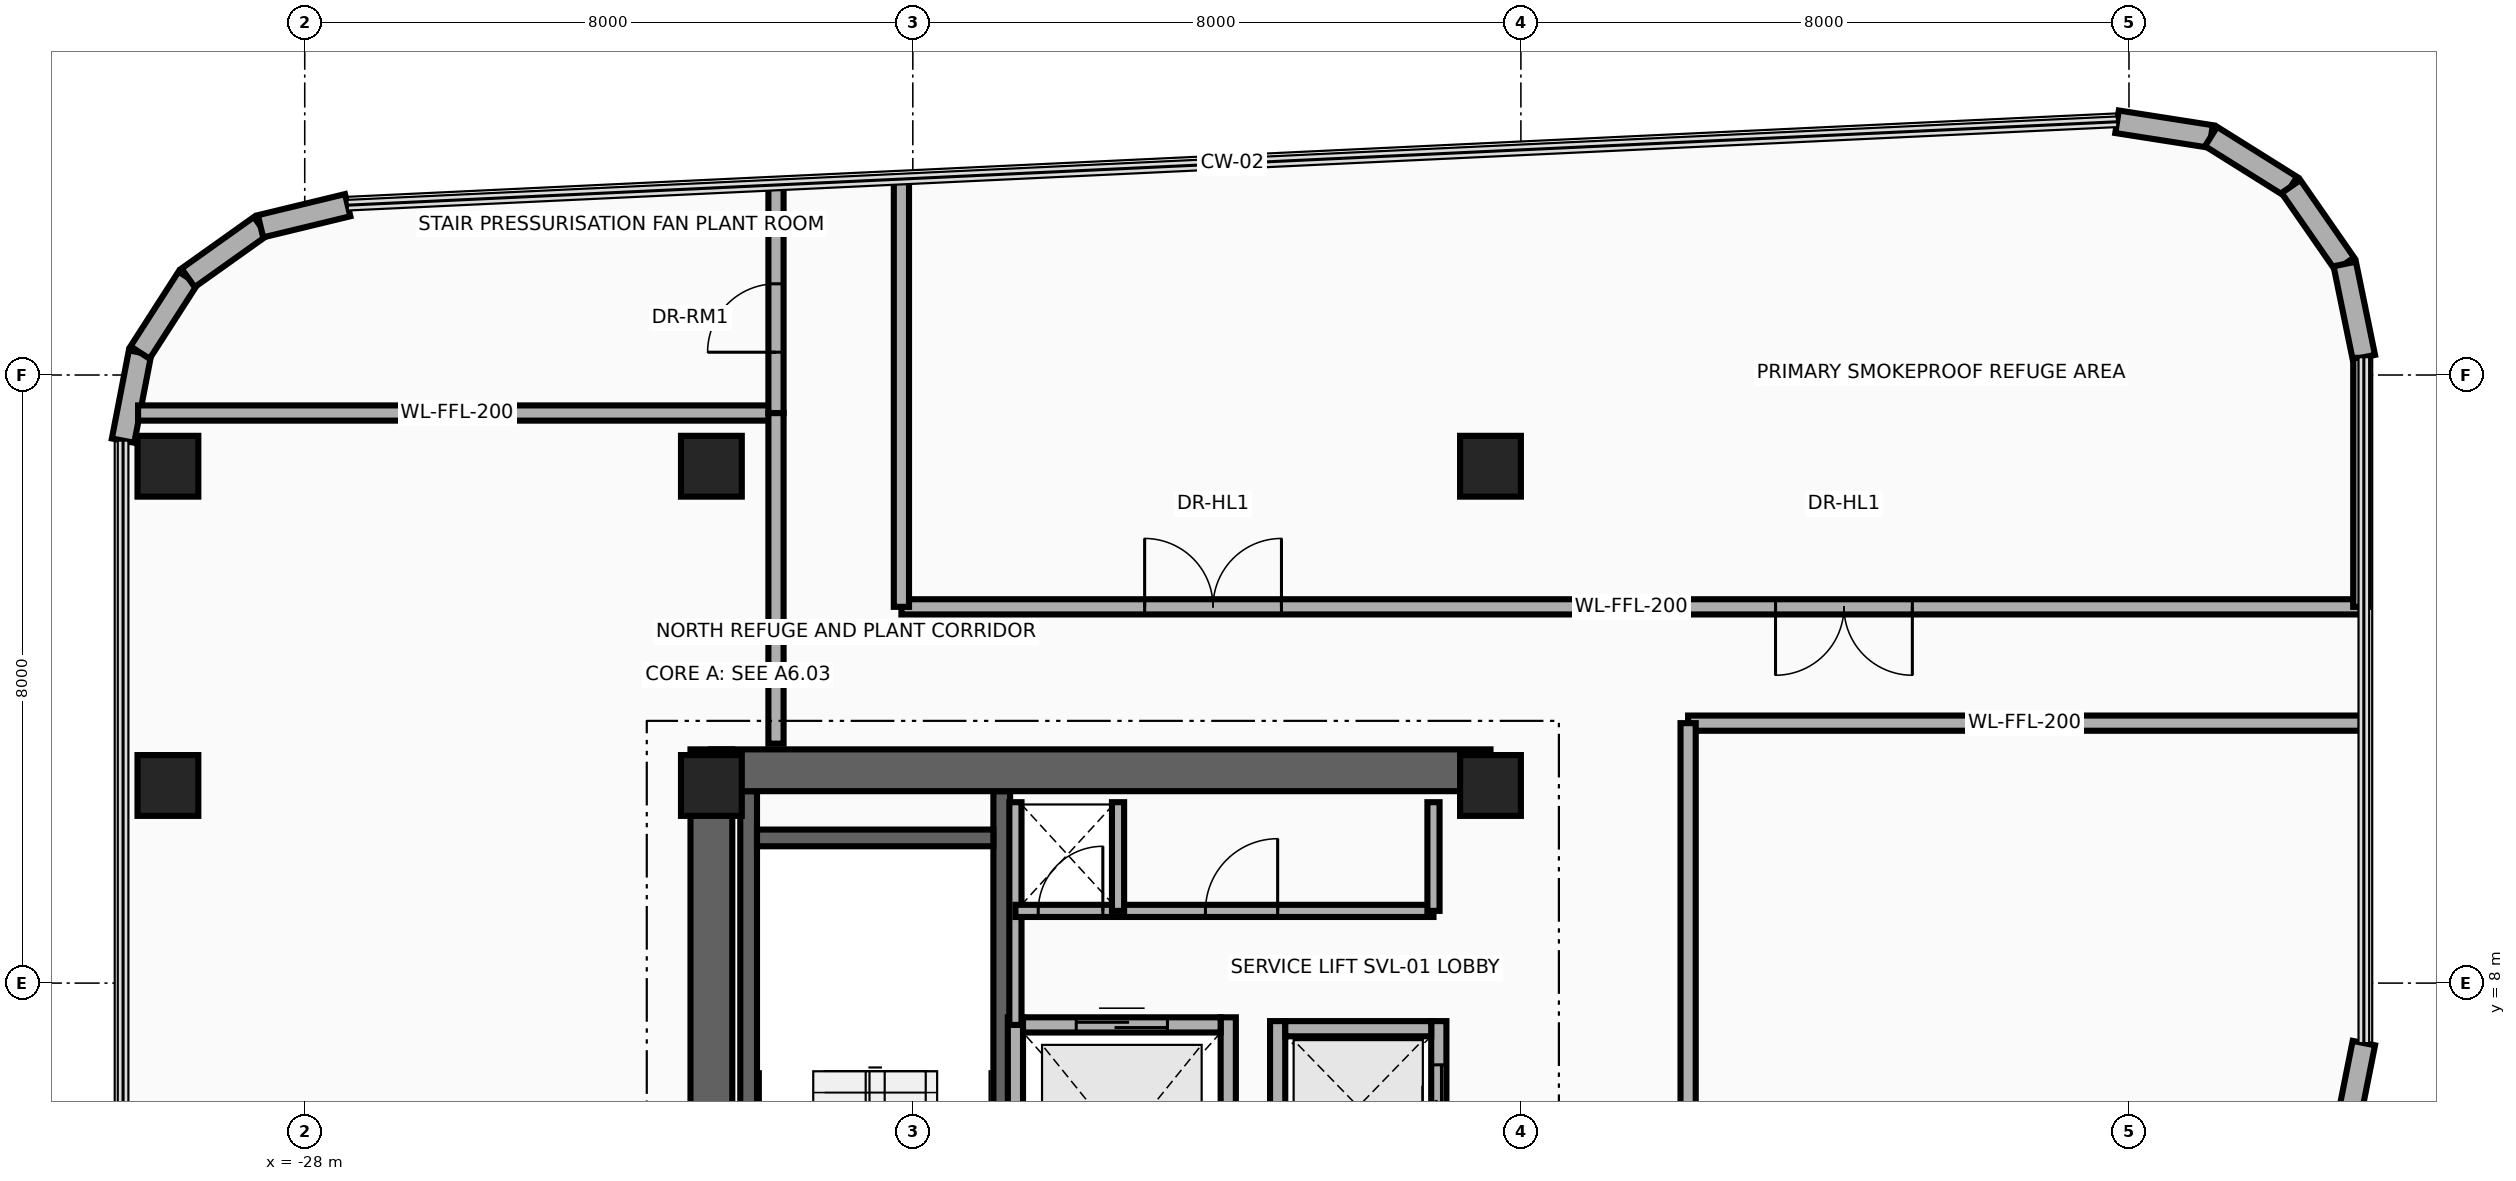
"""IFC4 building model, lengths in metres.
Left out: names, types, materials, properties, quantities, classifications, styles, units other than length and angle.
Written with IfcOpenShell. Run it as: python <this file> out.ifc"""

import sys

from ifc_helpers import new_model, si_unit, direction, frame, frame_2d, origin, origin_2d, place, context, subcontext, project, spatial, rectangle, extrude, source, transform, mapped, element, fill, save


model = new_model("IFC4")
c1 = context("Model", 3, precision=1e-05, world=origin(), true_north=direction((0.0, 1.0)))
c2 = subcontext(c1, "Body", "Model", "MODEL_VIEW")
j1 = project(units=[si_unit("LENGTHUNIT", "METRE"), si_unit("PLANEANGLEUNIT", "RADIAN")], contexts=[c1])
p1 = place(None, origin())
s1 = spatial("IfcSite", under=j1, at=p1, CompositionType="ELEMENT")
p2 = place(p1, origin())
s2 = spatial("IfcBuilding", under=s1, at=p2, CompositionType="ELEMENT")
p3 = place(p2, frame((0.0, 0.0, 261.5)))
s3 = spatial("IfcBuildingStorey", under=s2, at=p3, CompositionType="ELEMENT", Elevation=261.5)
for number, where, z_axis, x_axis in (
    (1, (-22.16, 1.78, 0.0), (0.0, 0.0, 1.0), (0.0, 1.0, 0.0)),
    (2, (-18.83, 1.78, 0.0), (0.0, 0.0, 1.0), (0.0, 1.0, 0.0)),
):
    element("IfcWall", number, at=place(p3, frame(where, z_axis=z_axis, x_axis=x_axis)), inside=s3, PredefinedType="SHEAR", context=c2, shape_type="SweptSolid", body=[
        extrude(rectangle(XDim=8.745, YDim=0.22, at=frame_2d((4.373, 0.0))), origin(), (0.0, 0.0, 1.0), 4.26),
    ])
p4 = place(p3, frame((-22.05, 9.91, 0.0), z_axis=(0.0, 0.0, 1.0), x_axis=(1.0, 0.0, 0.0)))
e3 = element("IfcWall", 3, at=p4, inside=s3, PredefinedType="SHEAR", context=c2, shape_type="SweptSolid", body=[
    extrude(rectangle(XDim=3.11, YDim=0.22, at=frame_2d((1.555, 0.0))), origin(), (0.0, 0.0, 1.0), 4.26),
])
p5 = place(p3, frame((-22.65, -11.075, 0.0), z_axis=(0.0, 0.0, 1.0), x_axis=(0.0, 1.0, 0.0)))
e4 = element("IfcWall", 4, at=p5, inside=s3, PredefinedType="SHEAR", context=c2, shape_type="SweptSolid", body=[
    extrude(rectangle(XDim=22.15, YDim=0.55, at=frame_2d((11.075, 0.0))), origin(), (0.0, 0.0, 1.0), 4.26),
])
p6 = place(p3, frame((-22.65, 10.8, 0.0), z_axis=(0.0, 0.0, 1.0), x_axis=(1.0, 0.0, 0.0)))
e5 = element("IfcWall", 5, at=p6, inside=s3, PredefinedType="SHEAR", context=c2, shape_type="SweptSolid", body=[
    extrude(rectangle(XDim=10.25, YDim=0.55, at=frame_2d((5.125, 0.0))), origin(), (0.0, 0.0, 1.0), 4.26),
])
m1 = source(origin(), c2, "Body", "SweptSolid", [
    extrude(rectangle(XDim=0.8, YDim=0.8, at=origin_2d()), origin(), (0.0, 0.0, 1.0), 4.5),
])
for number, where, z_axis, x_axis in (
    (6, (-29.8, 10.6, 0.0), (0.0, 0.0, 1.0), (1.0, 0.0, 0.0)),
    (7, (-22.65, 10.6, 0.0), (0.0, 0.0, 1.0), (1.0, 0.0, 0.0)),
    (8, (-12.4, 10.6, 0.0), (0.0, 0.0, 1.0), (1.0, 0.0, 0.0)),
    (9, (-29.8, 14.8, 0.0), (0.0, 0.0, 1.0), (1.0, 0.0, 0.0)),
    (10, (-22.65, 14.8, 0.0), (0.0, 0.0, 1.0), (1.0, 0.0, 0.0)),
    (11, (-12.4, 14.8, 0.0), (0.0, 0.0, 1.0), (1.0, 0.0, 0.0)),
):
    element("IfcColumn", number, at=place(p3, frame(where, z_axis=z_axis, x_axis=x_axis)), inside=s3, PredefinedType="COLUMN", context=c2, shape_type="MappedRepresentation", body=[
        mapped(m1, transform((0.0, 0.0, 0.0), x_axis=(1.0, 0.0, 0.0), y_axis=(0.0, 1.0, 0.0), z_axis=(0.0, 0.0, 1.0), scale=1.0)),
    ])
p7 = place(p3, frame((-30.39, 15.137, 0.0), z_axis=(0.0, 0.0, 1.0), x_axis=(0.189307792679, 0.981917796779, 0.0)))
e12 = element("IfcWall", 12, at=p7, inside=s3, PredefinedType="SOLIDWALL", context=c2, shape_type="SweptSolid", body=[
    extrude(rectangle(XDim=1.18, YDim=0.3, at=frame_2d((0.59, 0.0))), origin(), (0.0, 0.0, 1.0), 4.26),
])
p8 = place(p3, frame((-30.167, 16.295, 0.0), z_axis=(0.0, 0.0, 1.0), x_axis=(0.540842020947, 0.841124193195, 0.0)))
e13 = element("IfcWall", 13, at=p8, inside=s3, PredefinedType="SOLIDWALL", context=c2, shape_type="SweptSolid", body=[
    extrude(rectangle(XDim=1.169, YDim=0.3, at=frame_2d((0.584, 0.0))), origin(), (0.0, 0.0, 1.0), 4.26),
])
p9 = place(p3, frame((-29.534, 17.279, 0.0), z_axis=(0.0, 0.0, 1.0), x_axis=(0.81466371606, 0.579933642527, 0.0)))
e14 = element("IfcWall", 14, at=p9, inside=s3, PredefinedType="SOLIDWALL", context=c2, shape_type="SweptSolid", body=[
    extrude(rectangle(XDim=1.169, YDim=0.3, at=frame_2d((0.584, 0.0))), origin(), (0.0, 0.0, 1.0), 4.26),
])
p10 = place(p3, frame((-28.582, 17.957, 0.0), z_axis=(0.0, 0.0, 1.0), x_axis=(0.971929016595, 0.235274279725, 0.0)))
e15 = element("IfcWall", 15, at=p10, inside=s3, PredefinedType="SOLIDWALL", context=c2, shape_type="SweptSolid", body=[
    extrude(rectangle(XDim=1.18, YDim=0.3, at=frame_2d((0.59, 0.0))), origin(), (0.0, 0.0, 1.0), 4.26),
])
p11 = place(p3, frame((-4.157, 19.332, 0.0), z_axis=(0.0, 0.0, 1.0), x_axis=(0.987969236552, -0.15465053387, 0.0)))
e16 = element("IfcWall", 16, at=p11, inside=s3, PredefinedType="SOLIDWALL", context=c2, shape_type="SweptSolid", body=[
    extrude(rectangle(XDim=1.252, YDim=0.3, at=frame_2d((0.626, 0.0))), origin(), (0.0, 0.0, 1.0), 4.26),
])
for number, where, z_axis, x_axis in (
    (17, (-2.92, 19.138, 0.0), (0.0, 0.0, 1.0), (0.847, -0.531, 0.0)),
    (18, (-1.869, 18.48, 0.0), (0.0, 0.0, 1.0), (0.57, -0.822, 0.0)),
):
    element("IfcWall", number, at=place(p3, frame(where, z_axis=z_axis, x_axis=x_axis)), inside=s3, PredefinedType="SOLIDWALL", context=c2, shape_type="SweptSolid", body=[
        extrude(rectangle(XDim=1.24, YDim=0.3, at=frame_2d((0.62, 0.0))), origin(), (0.0, 0.0, 1.0), 4.26),
    ])
p12 = place(p3, frame((-1.161, 17.461, 0.0), z_axis=(0.0, 0.0, 1.0), x_axis=(0.20087696073, -0.979616479367, 0.0)))
e19 = element("IfcWall", 19, at=p12, inside=s3, PredefinedType="SOLIDWALL", context=c2, shape_type="SweptSolid", body=[
    extrude(rectangle(XDim=1.252, YDim=0.3, at=frame_2d((0.626, 0.0))), origin(), (0.0, 0.0, 1.0), 4.26),
])
p13 = place(p3, frame((-0.91, 7.211, 0.0), z_axis=(0.0, 0.0, 1.0), x_axis=(-0.195189223115, -0.980765602568, 0.0)))
e20 = element("IfcWall", 20, at=p13, inside=s3, PredefinedType="SOLIDWALL", context=c2, shape_type="SweptSolid", body=[
    extrude(rectangle(XDim=1.216, YDim=0.3, at=frame_2d((0.608, 0.0))), origin(), (0.0, 0.0, 1.0), 4.26),
])
for number, where, z_axis, x_axis in (
    (21, (-18.65, 4.225, 0.0), (0.0, 0.0, 1.0), (0.0, 1.0, 0.0)),
    (22, (-15.85, 4.225, 0.0), (0.0, 0.0, 1.0), (0.0, 1.0, 0.0)),
):
    element("IfcWall", number, at=place(p3, frame(where, z_axis=z_axis, x_axis=x_axis)), inside=s3, PredefinedType="MOVABLE", context=c2, shape_type="SweptSolid", body=[
        extrude(rectangle(XDim=3.325, YDim=0.2, at=frame_2d((1.663, 0.0))), origin(), (0.0, 0.0, 1.0), 4.26),
    ])
p14 = place(p3, frame((-18.55, 7.45, 0.0), z_axis=(0.0, 0.0, 1.0), x_axis=(1.0, 0.0, 0.0)))
e23 = element("IfcWall", 23, at=p14, inside=s3, PredefinedType="MOVABLE", context=c2, shape_type="SweptSolid", body=[
    extrude(rectangle(XDim=2.6, YDim=0.2, at=frame_2d((1.3, 0.0))), origin(), (0.0, 0.0, 1.0), 4.26),
])
p15 = place(p14, frame((0.7, 0.0, 0.0)))
e24 = element("IfcOpeningElement", 24, at=p15, cuts=e23, PredefinedType="OPENING", context=c2, shape_type="SweptSolid", body=[
    extrude(rectangle(XDim=1.2, YDim=2.1, at=frame_2d((0.6, 1.05))), frame((0.0, 0.115, 0.0), z_axis=(0.0, -1.0, 0.0), x_axis=(1.0, 0.0, 0.0)), (0.0, 0.0, 1.0), 0.23),
])
p16 = place(p3, frame((-15.2, 5.25, 0.0), z_axis=(0.0, 0.0, 1.0), x_axis=(0.0, 1.0, 0.0)))
e25 = element("IfcWall", 25, at=p16, inside=s3, PredefinedType="MOVABLE", context=c2, shape_type="SweptSolid", body=[
    extrude(rectangle(XDim=2.25, YDim=0.2, at=frame_2d((1.125, 0.0))), origin(), (0.0, 0.0, 1.0), 4.26),
])
p17 = place(p3, frame((-13.08, 5.25, 0.0), z_axis=(0.0, 0.0, 1.0), x_axis=(0.0, 1.0, 0.0)))
e26 = element("IfcWall", 26, at=p17, inside=s3, PredefinedType="MOVABLE", context=c2, shape_type="SweptSolid", body=[
    extrude(rectangle(XDim=2.25, YDim=0.2, at=frame_2d((1.125, 0.0))), origin(), (0.0, 0.0, 1.0), 4.26),
])
p18 = place(p17, frame((0.575, 0.0, 0.0)))
e27 = element("IfcOpeningElement", 27, at=p18, cuts=e26, PredefinedType="OPENING", context=c2, shape_type="SweptSolid", body=[
    extrude(rectangle(XDim=1.1, YDim=2.1, at=frame_2d((0.55, 1.05))), frame((0.0, 0.115, 0.0), z_axis=(0.0, -1.0, 0.0), x_axis=(1.0, 0.0, 0.0)), (0.0, 0.0, 1.0), 0.23),
])
p19 = place(p3, frame((-15.1, 7.4, 0.0), z_axis=(0.0, 0.0, 1.0), x_axis=(1.0, 0.0, 0.0)))
e28 = element("IfcWall", 28, at=p19, inside=s3, PredefinedType="MOVABLE", context=c2, shape_type="SweptSolid", body=[
    extrude(rectangle(XDim=1.92, YDim=0.2, at=frame_2d((0.96, 0.0))), origin(), (0.0, 0.0, 1.0), 4.26),
])
p20 = place(p3, frame((-18.65, 7.45, 0.0), z_axis=(0.0, 0.0, 1.0), x_axis=(0.0, 1.0, 0.0)))
e29 = element("IfcWall", 29, at=p20, inside=s3, PredefinedType="PARTITIONING", context=c2, shape_type="SweptSolid", body=[
    extrude(rectangle(XDim=2.93, YDim=0.16, at=frame_2d((1.465, 0.0))), origin(), (0.0, 0.0, 1.0), 4.26),
])
p21 = place(p3, frame((-18.65, 8.95, 0.0), z_axis=(0.0, 0.0, 1.0), x_axis=(1.0, 0.0, 0.0)))
e30 = element("IfcWall", 30, at=p21, inside=s3, PredefinedType="PARTITIONING", context=c2, shape_type="SweptSolid", body=[
    extrude(rectangle(XDim=5.5, YDim=0.16, at=frame_2d((2.75, 0.0))), origin(), (0.0, 0.0, 1.0), 4.26),
])
p22 = place(p21, frame((0.3, 0.0, 0.0)))
e31 = element("IfcOpeningElement", 31, at=p22, cuts=e30, PredefinedType="OPENING", context=c2, shape_type="SweptSolid", body=[
    extrude(rectangle(XDim=0.85, YDim=2.05, at=frame_2d((0.425, 1.025))), frame((0.0, 0.095, 0.0), z_axis=(0.0, -1.0, 0.0), x_axis=(1.0, 0.0, 0.0)), (0.0, 0.0, 1.0), 0.19),
])
p23 = place(p21, frame((2.5, 0.0, 0.0)))
e32 = element("IfcOpeningElement", 32, at=p23, cuts=e30, PredefinedType="OPENING", context=c2, shape_type="SweptSolid", body=[
    extrude(rectangle(XDim=0.95, YDim=2.15, at=frame_2d((0.475, 1.075))), frame((0.0, 0.095, 0.0), z_axis=(0.0, -1.0, 0.0), x_axis=(1.0, 0.0, 0.0)), (0.0, 0.0, 1.0), 0.19),
])
for number, where, z_axis, x_axis in (
    (33, (-13.15, 8.95, 0.0), (0.0, 0.0, 1.0), (0.0, 1.0, 0.0)),
    (34, (-17.3, 8.95, 0.0), (0.0, 0.0, 1.0), (0.0, 1.0, 0.0)),
):
    element("IfcWall", number, at=place(p3, frame(where, z_axis=z_axis, x_axis=x_axis)), inside=s3, PredefinedType="PARTITIONING", context=c2, shape_type="SweptSolid", body=[
        extrude(rectangle(XDim=1.43, YDim=0.16, at=frame_2d((0.715, 0.0))), origin(), (0.0, 0.0, 1.0), 4.26),
    ])
p24 = place(p3, frame((-30.193, 15.5, 0.0), z_axis=(0.0, 0.0, 1.0), x_axis=(1.0, 0.0, 0.0)))
e35 = element("IfcWall", 35, at=p24, inside=s3, PredefinedType="PARTITIONING", context=c2, shape_type="SweptSolid", body=[
    extrude(rectangle(XDim=8.393, YDim=0.2, at=frame_2d((4.196, 0.0))), origin(), (0.0, 0.0, 1.0), 4.26),
])
p25 = place(p3, frame((-21.8, 11.15, 0.0), z_axis=(0.0, 0.0, 1.0), x_axis=(0.0, 1.0, 0.0)))
e36 = element("IfcWall", 36, at=p25, inside=s3, PredefinedType="PARTITIONING", context=c2, shape_type="SweptSolid", body=[
    extrude(rectangle(XDim=4.35, YDim=0.2, at=frame_2d((2.175, 0.0))), origin(), (0.0, 0.0, 1.0), 3.623),
])
p26 = place(p3, frame((-21.8, 15.5, 0.0), z_axis=(0.0, 0.0, 1.0), x_axis=(0.0, 1.0, 0.0)))
e37 = element("IfcWall", 37, at=p26, inside=s3, PredefinedType="PARTITIONING", context=c2, shape_type="SweptSolid", body=[
    extrude(rectangle(XDim=3.0, YDim=0.2, at=frame_2d((1.5, 0.0))), origin(), (0.0, 0.0, 1.0), 4.26),
])
p27 = place(p26, frame((0.8, 0.0, 0.0)))
e38 = element("IfcOpeningElement", 38, at=p27, cuts=e37, PredefinedType="OPENING", context=c2, shape_type="SweptSolid", body=[
    extrude(rectangle(XDim=0.9, YDim=2.1, at=frame_2d((0.45, 1.05))), frame((0.0, 0.115, 0.0), z_axis=(0.0, -1.0, 0.0), x_axis=(1.0, 0.0, 0.0)), (0.0, 0.0, 1.0), 0.23),
])
p28 = place(p3, frame((-20.15, 12.95, 0.0), z_axis=(0.0, 0.0, 1.0), x_axis=(1.0, 0.0, 0.0)))
e39 = element("IfcWall", 39, at=p28, inside=s3, PredefinedType="PARTITIONING", context=c2, shape_type="SweptSolid", body=[
    extrude(rectangle(XDim=19.2, YDim=0.2, at=frame_2d((9.6, 0.0))), origin(), (0.0, 0.0, 1.0), 3.634),
])
p29 = place(p28, frame((3.2, 0.0, 0.0)))
e40 = element("IfcOpeningElement", 40, at=p29, cuts=e39, PredefinedType="OPENING", context=c2, shape_type="SweptSolid", body=[
    extrude(rectangle(XDim=1.8, YDim=2.15, at=frame_2d((0.9, 1.075))), frame((0.0, 0.115, 0.0), z_axis=(0.0, -1.0, 0.0), x_axis=(1.0, 0.0, 0.0)), (0.0, 0.0, 1.0), 0.23),
])
p30 = place(p28, frame((11.5, 0.0, 0.0)))
e41 = element("IfcOpeningElement", 41, at=p30, cuts=e39, PredefinedType="OPENING", context=c2, shape_type="SweptSolid", body=[
    extrude(rectangle(XDim=1.8, YDim=2.15, at=frame_2d((0.9, 1.075))), frame((0.0, 0.115, 0.0), z_axis=(0.0, -1.0, 0.0), x_axis=(1.0, 0.0, 0.0)), (0.0, 0.0, 1.0), 0.23),
])
p31 = place(p3, frame((-20.15, 12.95, 0.0), z_axis=(0.0, 0.0, 1.0), x_axis=(0.0, 1.0, 0.0)))
e42 = element("IfcWall", 42, at=p31, inside=s3, PredefinedType="PARTITIONING", context=c2, shape_type="SweptSolid", body=[
    extrude(rectangle(XDim=5.628, YDim=0.2, at=frame_2d((2.814, 0.0))), origin(), (0.0, 0.0, 1.0), 3.623),
])
p32 = place(p3, frame((-0.95, 12.95, 0.0), z_axis=(0.0, 0.0, 1.0), x_axis=(0.0, 1.0, 0.0)))
e43 = element("IfcWall", 43, at=p32, inside=s3, PredefinedType="PARTITIONING", context=c2, shape_type="SweptSolid", body=[
    extrude(rectangle(XDim=3.276, YDim=0.2, at=frame_2d((1.638, 0.0))), origin(), (0.0, 0.0, 1.0), 4.26),
])
p33 = place(p3, frame((-9.8, 11.42, 0.0), z_axis=(0.0, 0.0, 1.0), x_axis=(1.0, 0.0, 0.0)))
e44 = element("IfcWall", 44, at=p33, inside=s3, PredefinedType="PARTITIONING", context=c2, shape_type="SweptSolid", body=[
    extrude(rectangle(XDim=8.85, YDim=0.2, at=frame_2d((4.425, 0.0))), origin(), (0.0, 0.0, 1.0), 4.26),
])
p34 = place(p3, frame((-9.8, -12.9, 0.0), z_axis=(0.0, 0.0, 1.0), x_axis=(0.0, 1.0, 0.0)))
e45 = element("IfcWall", 45, at=p34, inside=s3, PredefinedType="PARTITIONING", context=c2, shape_type="SweptSolid", body=[
    extrude(rectangle(XDim=24.32, YDim=0.2, at=frame_2d((12.16, 0.0))), origin(), (0.0, 0.0, 1.0), 4.26),
])
p35 = place(p15, origin())
e46 = element("IfcDoor", 46, at=p35, inside=s3, OperationType="DOUBLE_DOOR_SLIDING", PredefinedType="DOOR", context=c2, shape_type="SweptSolid", body=[
    extrude(rectangle(XDim=1.2, YDim=2.1, at=frame_2d((0.6, 1.05))), frame((0.0, 0.025, 0.0), z_axis=(0.0, -1.0, 0.0), x_axis=(1.0, 0.0, 0.0)), (0.0, 0.0, 1.0), 0.05),
])
fill(e24, e46)
p36 = place(p18, origin())
e47 = element("IfcDoor", 47, at=p36, inside=s3, OperationType="DOUBLE_DOOR_SLIDING", PredefinedType="DOOR", context=c2, shape_type="SweptSolid", body=[
    extrude(rectangle(XDim=1.1, YDim=2.1, at=frame_2d((0.55, 1.05))), frame((0.0, 0.025, 0.0), z_axis=(0.0, -1.0, 0.0), x_axis=(1.0, 0.0, 0.0)), (0.0, 0.0, 1.0), 0.05),
])
fill(e27, e47)
p37 = place(p22, origin())
e48 = element("IfcDoor", 48, at=p37, inside=s3, OperationType="SINGLE_SWING_LEFT", PredefinedType="DOOR", context=c2, shape_type="SweptSolid", body=[
    extrude(rectangle(XDim=0.85, YDim=2.05, at=frame_2d((0.425, 1.025))), frame((0.0, 0.025, 0.0), z_axis=(0.0, -1.0, 0.0), x_axis=(1.0, 0.0, 0.0)), (0.0, 0.0, 1.0), 0.05),
])
fill(e31, e48)
p38 = place(p23, origin())
e49 = element("IfcDoor", 49, at=p38, inside=s3, OperationType="SINGLE_SWING_RIGHT", PredefinedType="DOOR", context=c2, shape_type="SweptSolid", body=[
    extrude(rectangle(XDim=0.95, YDim=2.15, at=frame_2d((0.475, 1.075))), frame((0.0, 0.025, 0.0), z_axis=(0.0, -1.0, 0.0), x_axis=(1.0, 0.0, 0.0)), (0.0, 0.0, 1.0), 0.05),
])
fill(e32, e49)
p39 = place(p27, origin())
e50 = element("IfcDoor", 50, at=p39, inside=s3, OperationType="SINGLE_SWING_LEFT", PredefinedType="DOOR", context=c2, shape_type="SweptSolid", body=[
    extrude(rectangle(XDim=0.9, YDim=2.1, at=frame_2d((0.45, 1.05))), frame((0.0, 0.025, 0.0), z_axis=(0.0, -1.0, 0.0), x_axis=(1.0, 0.0, 0.0)), (0.0, 0.0, 1.0), 0.05),
])
fill(e38, e50)
p40 = place(p29, origin())
e51 = element("IfcDoor", 51, at=p40, inside=s3, OperationType="DOUBLE_DOOR_SINGLE_SWING", PredefinedType="DOOR", context=c2, shape_type="SweptSolid", body=[
    extrude(rectangle(XDim=1.8, YDim=2.15, at=frame_2d((0.9, 1.075))), frame((0.0, 0.025, 0.0), z_axis=(0.0, -1.0, 0.0), x_axis=(1.0, 0.0, 0.0)), (0.0, 0.0, 1.0), 0.05),
])
fill(e40, e51)
p41 = place(p30, frame((1.8, 0.0, 0.0), z_axis=(0.0, 0.0, 1.0), x_axis=(-1.0, 0.0, 0.0)))
e52 = element("IfcDoor", 52, at=p41, inside=s3, OperationType="DOUBLE_DOOR_SINGLE_SWING", PredefinedType="DOOR", context=c2, shape_type="SweptSolid", body=[
    extrude(rectangle(XDim=1.8, YDim=2.15, at=frame_2d((0.9, 1.075))), frame((0.0, 0.025, 0.0), z_axis=(0.0, -1.0, 0.0), x_axis=(1.0, 0.0, 0.0)), (0.0, 0.0, 1.0), 0.05),
])
fill(e41, e52)
save(model, sys.argv[1])
